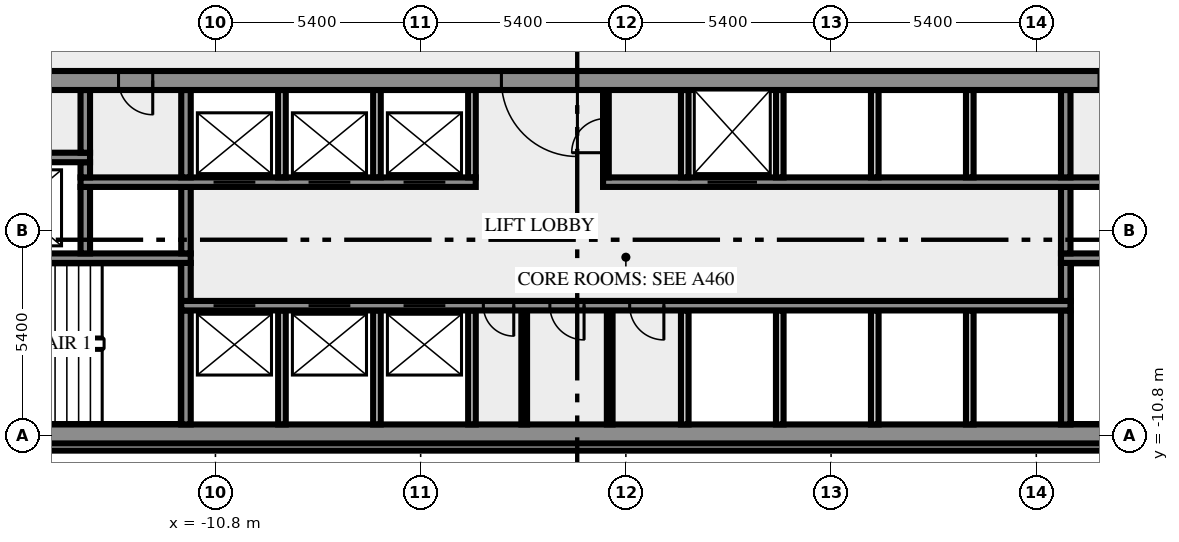
"""IFC4 building model, lengths in metres.
Left out: names, types, materials, properties, quantities, classifications, styles, units other than length and angle.
Written with IfcOpenShell. Run it as: python <this file> out.ifc"""

import sys

from ifc_helpers import new_model, si_unit, direction, frame, frame_2d, origin, place, context, subcontext, project, spatial, rectangle, extrude, element, fill, save


model = new_model("IFC4")
c1 = context("Model", 3, precision=1e-05, world=origin(), true_north=direction((0.0, 1.0)))
c2 = subcontext(c1, "Body", "Model", "MODEL_VIEW")
j1 = project(units=[si_unit("LENGTHUNIT", "METRE"), si_unit("PLANEANGLEUNIT", "RADIAN")], contexts=[c1])
p1 = place(None, origin())
s1 = spatial("IfcSite", under=j1, at=p1, CompositionType="ELEMENT")
p2 = place(p1, origin())
s2 = spatial("IfcBuilding", under=s1, at=p2, CompositionType="ELEMENT")
p3 = place(p2, frame((0.0, 0.0, 67.0)))
s3 = spatial("IfcBuildingStorey", under=s2, at=p3, CompositionType="ELEMENT", Elevation=67.0)
p4 = place(p3, frame((-17.444, -11.088, 0.0), z_axis=(0.0, 0.0, 1.0), x_axis=(1.0, 0.0, 0.0)))
e1 = element("IfcWall", 1, at=p4, inside=s3, PredefinedType="SOLIDWALL", context=c2, shape_type="SweptSolid", body=[
    extrude(rectangle(XDim=34.888, YDim=0.2, at=frame_2d((17.444, 0.0))), origin(), (0.0, 0.0, 1.0), 3.65),
])
p5 = place(p3, frame((-20.0, -10.75, 0.0), z_axis=(0.0, 0.0, 1.0), x_axis=(1.0, 0.0, 0.0)))
e2 = element("IfcWall", 2, at=p5, inside=s3, PredefinedType="SHEAR", context=c2, shape_type="SweptSolid", body=[
    extrude(rectangle(XDim=40.0, YDim=0.5, at=frame_2d((20.0, 0.0))), origin(), (0.0, 0.0, 1.0), 3.65),
])
p6 = place(p5, frame((0.8, 0.0, 1.0)))
e3 = element("IfcOpeningElement", 3, at=p6, cuts=e2, PredefinedType="OPENING", context=c2, shape_type="SweptSolid", body=[
    extrude(rectangle(XDim=1.2, YDim=1.2, at=frame_2d((0.6, 0.6))), frame((0.0, 0.26, 0.0), z_axis=(0.0, -1.0, 0.0), x_axis=(1.0, 0.0, 0.0)), (0.0, 0.0, 1.0), 0.52),
])
p7 = place(p5, frame((38.0, 0.0, 1.0)))
e4 = element("IfcOpeningElement", 4, at=p7, cuts=e2, PredefinedType="OPENING", context=c2, shape_type="SweptSolid", body=[
    extrude(rectangle(XDim=1.2, YDim=1.2, at=frame_2d((0.6, 0.6))), frame((0.0, 0.26, 0.0), z_axis=(0.0, -1.0, 0.0), x_axis=(1.0, 0.0, 0.0)), (0.0, 0.0, 1.0), 0.52),
])
p8 = place(p3, frame((-11.575, -10.5, 0.0), z_axis=(0.0, 0.0, 1.0), x_axis=(0.0, 1.0, 0.0)))
e5 = element("IfcWall", 5, at=p8, inside=s3, PredefinedType="SHEAR", context=c2, shape_type="SweptSolid", body=[
    extrude(rectangle(XDim=3.0, YDim=0.25, at=frame_2d((1.5, 0.0))), origin(), (0.0, 0.0, 1.0), 3.65),
])
for number, where, z_axis, x_axis in (
    (6, (-9.05, -10.5, 0.0), (0.0, 0.0, 1.0), (0.0, 1.0, 0.0)),
    (7, (-6.55, -10.5, 0.0), (0.0, 0.0, 1.0), (0.0, 1.0, 0.0)),
    (8, (-4.05, -10.5, 0.0), (0.0, 0.0, 1.0), (0.0, 1.0, 0.0)),
):
    element("IfcWall", number, at=place(p3, frame(where, z_axis=z_axis, x_axis=x_axis)), inside=s3, PredefinedType="SOLIDWALL", context=c2, shape_type="SweptSolid", body=[
        extrude(rectangle(XDim=3.0, YDim=0.2, at=frame_2d((1.5, 0.0))), origin(), (0.0, 0.0, 1.0), 3.65),
    ])
for number, where, z_axis, x_axis in (
    (9, (-2.675, -10.5, 0.0), (0.0, 0.0, 1.0), (0.0, 1.0, 0.0)),
    (10, (-0.425, -10.5, 0.0), (0.0, 0.0, 1.0), (0.0, 1.0, 0.0)),
):
    element("IfcWall", number, at=place(p3, frame(where, z_axis=z_axis, x_axis=x_axis)), inside=s3, PredefinedType="PARTITIONING", context=c2, shape_type="SweptSolid", body=[
        extrude(rectangle(XDim=3.0, YDim=0.15, at=frame_2d((1.5, 0.0))), origin(), (0.0, 0.0, 1.0), 3.65),
    ])
for number, where, z_axis, x_axis in (
    (11, (1.55, -10.5, 0.0), (0.0, 0.0, 1.0), (0.0, 1.0, 0.0)),
    (12, (4.05, -10.5, 0.0), (0.0, 0.0, 1.0), (0.0, 1.0, 0.0)),
    (13, (6.55, -10.5, 0.0), (0.0, 0.0, 1.0), (0.0, 1.0, 0.0)),
    (14, (9.05, -10.5, 0.0), (0.0, 0.0, 1.0), (0.0, 1.0, 0.0)),
):
    element("IfcWall", number, at=place(p3, frame(where, z_axis=z_axis, x_axis=x_axis)), inside=s3, PredefinedType="SOLIDWALL", context=c2, shape_type="SweptSolid", body=[
        extrude(rectangle(XDim=3.0, YDim=0.2, at=frame_2d((1.5, 0.0))), origin(), (0.0, 0.0, 1.0), 3.65),
    ])
p9 = place(p3, frame((11.575, -10.5, 0.0), z_axis=(0.0, 0.0, 1.0), x_axis=(0.0, 1.0, 0.0)))
e15 = element("IfcWall", 15, at=p9, inside=s3, PredefinedType="SHEAR", context=c2, shape_type="SweptSolid", body=[
    extrude(rectangle(XDim=3.0, YDim=0.25, at=frame_2d((1.5, 0.0))), origin(), (0.0, 0.0, 1.0), 3.65),
])
p10 = place(p3, frame((11.7, -7.375, 0.0), z_axis=(0.0, 0.0, 1.0), x_axis=(-1.0, 0.0, 0.0)))
e16 = element("IfcWall", 16, at=p10, inside=s3, PredefinedType="SHEAR", context=c2, shape_type="SweptSolid", body=[
    extrude(rectangle(XDim=23.4, YDim=0.25, at=frame_2d((11.7, 0.0))), origin(), (0.0, 0.0, 1.0), 3.65),
])
p11 = place(p10, frame((21.45, 0.0, 0.0)))
e17 = element("IfcOpeningElement", 17, at=p11, cuts=e16, PredefinedType="OPENING", context=c2, shape_type="SweptSolid", body=[
    extrude(rectangle(XDim=1.1, YDim=2.1, at=frame_2d((0.55, 1.05))), frame((0.0, 0.135, 0.0), z_axis=(0.0, -1.0, 0.0), x_axis=(1.0, 0.0, 0.0)), (0.0, 0.0, 1.0), 0.27),
])
p12 = place(p10, frame((18.95, 0.0, 0.0)))
e18 = element("IfcOpeningElement", 18, at=p12, cuts=e16, PredefinedType="OPENING", context=c2, shape_type="SweptSolid", body=[
    extrude(rectangle(XDim=1.1, YDim=2.1, at=frame_2d((0.55, 1.05))), frame((0.0, 0.135, 0.0), z_axis=(0.0, -1.0, 0.0), x_axis=(1.0, 0.0, 0.0)), (0.0, 0.0, 1.0), 0.27),
])
p13 = place(p10, frame((16.45, 0.0, 0.0)))
e19 = element("IfcOpeningElement", 19, at=p13, cuts=e16, PredefinedType="OPENING", context=c2, shape_type="SweptSolid", body=[
    extrude(rectangle(XDim=1.1, YDim=2.1, at=frame_2d((0.55, 1.05))), frame((0.0, 0.135, 0.0), z_axis=(0.0, -1.0, 0.0), x_axis=(1.0, 0.0, 0.0)), (0.0, 0.0, 1.0), 0.27),
])
p14 = place(p10, frame((14.65, 0.0, 0.0)))
e20 = element("IfcOpeningElement", 20, at=p14, cuts=e16, PredefinedType="OPENING", context=c2, shape_type="SweptSolid", body=[
    extrude(rectangle(XDim=0.8, YDim=2.1, at=frame_2d((0.4, 1.05))), frame((0.0, 0.135, 0.0), z_axis=(0.0, -1.0, 0.0), x_axis=(1.0, 0.0, 0.0)), (0.0, 0.0, 1.0), 0.27),
])
p15 = place(p10, frame((12.8, 0.0, 0.0)))
e21 = element("IfcOpeningElement", 21, at=p15, cuts=e16, PredefinedType="OPENING", context=c2, shape_type="SweptSolid", body=[
    extrude(rectangle(XDim=0.9, YDim=2.1, at=frame_2d((0.45, 1.05))), frame((0.0, 0.135, 0.0), z_axis=(0.0, -1.0, 0.0), x_axis=(1.0, 0.0, 0.0)), (0.0, 0.0, 1.0), 0.27),
])
p16 = place(p10, frame((10.7, 0.0, 0.0)))
e22 = element("IfcOpeningElement", 22, at=p16, cuts=e16, PredefinedType="OPENING", context=c2, shape_type="SweptSolid", body=[
    extrude(rectangle(XDim=0.9, YDim=2.1, at=frame_2d((0.45, 1.05))), frame((0.0, 0.135, 0.0), z_axis=(0.0, -1.0, 0.0), x_axis=(1.0, 0.0, 0.0)), (0.0, 0.0, 1.0), 0.27),
])
for number, where, z_axis, x_axis in (
    (23, (-11.575, -7.25, 0.0), (0.0, 0.0, 1.0), (0.0, 1.0, 0.0)),
    (24, (11.575, -7.25, 0.0), (0.0, 0.0, 1.0), (0.0, 1.0, 0.0)),
):
    element("IfcWall", number, at=place(p3, frame(where, z_axis=z_axis, x_axis=x_axis)), inside=s3, PredefinedType="SHEAR", context=c2, shape_type="SweptSolid", body=[
        extrude(rectangle(XDim=1.0, YDim=0.25, at=frame_2d((0.5, 0.0))), origin(), (0.0, 0.0, 1.0), 3.65),
    ])
p17 = place(p3, frame((-11.45, -6.125, 0.0), z_axis=(0.0, 0.0, 1.0), x_axis=(-1.0, 0.0, 0.0)))
e25 = element("IfcWall", 25, at=p17, inside=s3, PredefinedType="SHEAR", context=c2, shape_type="SweptSolid", body=[
    extrude(rectangle(XDim=8.05, YDim=0.25, at=frame_2d((4.025, 0.0))), origin(), (0.0, 0.0, 1.0), 3.65),
])
p18 = place(p17, frame((6.2, 0.0, 0.0)))
e26 = element("IfcOpeningElement", 26, at=p18, cuts=e25, PredefinedType="OPENING", context=c2, shape_type="SweptSolid", body=[
    extrude(rectangle(XDim=1.8, YDim=2.1, at=frame_2d((0.9, 1.05))), frame((0.0, 0.135, 0.0), z_axis=(0.0, -1.0, 0.0), x_axis=(1.0, 0.0, 0.0)), (0.0, 0.0, 1.0), 0.27),
])
p19 = place(p3, frame((19.5, -6.125, 0.0), z_axis=(0.0, 0.0, 1.0), x_axis=(-1.0, 0.0, 0.0)))
e27 = element("IfcWall", 27, at=p19, inside=s3, PredefinedType="SHEAR", context=c2, shape_type="SweptSolid", body=[
    extrude(rectangle(XDim=8.05, YDim=0.25, at=frame_2d((4.025, 0.0))), origin(), (0.0, 0.0, 1.0), 3.65),
])
p20 = place(p19, frame((0.05, 0.0, 0.0)))
e28 = element("IfcOpeningElement", 28, at=p20, cuts=e27, PredefinedType="OPENING", context=c2, shape_type="SweptSolid", body=[
    extrude(rectangle(XDim=1.8, YDim=2.1, at=frame_2d((0.9, 1.05))), frame((0.0, 0.135, 0.0), z_axis=(0.0, -1.0, 0.0), x_axis=(1.0, 0.0, 0.0)), (0.0, 0.0, 1.0), 0.27),
])
for number, where, z_axis, x_axis in (
    (29, (-14.225, -6.0, 0.0), (0.0, 0.0, 1.0), (0.0, 1.0, 0.0)),
    (30, (-11.575, -6.0, 0.0), (0.0, 0.0, 1.0), (0.0, 1.0, 0.0)),
    (31, (11.575, -6.0, 0.0), (0.0, 0.0, 1.0), (0.0, 1.0, 0.0)),
):
    element("IfcWall", number, at=place(p3, frame(where, z_axis=z_axis, x_axis=x_axis)), inside=s3, PredefinedType="SHEAR", context=c2, shape_type="SweptSolid", body=[
        extrude(rectangle(XDim=1.75, YDim=0.25, at=frame_2d((0.875, 0.0))), origin(), (0.0, 0.0, 1.0), 3.65),
    ])
p21 = place(p3, frame((-14.35, -4.125, 0.0), z_axis=(0.0, 0.0, 1.0), x_axis=(1.0, 0.0, 0.0)))
e32 = element("IfcWall", 32, at=p21, inside=s3, PredefinedType="SHEAR", context=c2, shape_type="SweptSolid", body=[
    extrude(rectangle(XDim=10.4, YDim=0.25, at=frame_2d((5.2, 0.0))), origin(), (0.0, 0.0, 1.0), 3.65),
])
p22 = place(p21, frame((3.5, 0.0, 0.0)))
e33 = element("IfcOpeningElement", 33, at=p22, cuts=e32, PredefinedType="OPENING", context=c2, shape_type="SweptSolid", body=[
    extrude(rectangle(XDim=1.1, YDim=2.1, at=frame_2d((0.55, 1.05))), frame((0.0, 0.135, 0.0), z_axis=(0.0, -1.0, 0.0), x_axis=(1.0, 0.0, 0.0)), (0.0, 0.0, 1.0), 0.27),
])
p23 = place(p21, frame((6.0, 0.0, 0.0)))
e34 = element("IfcOpeningElement", 34, at=p23, cuts=e32, PredefinedType="OPENING", context=c2, shape_type="SweptSolid", body=[
    extrude(rectangle(XDim=1.1, YDim=2.1, at=frame_2d((0.55, 1.05))), frame((0.0, 0.135, 0.0), z_axis=(0.0, -1.0, 0.0), x_axis=(1.0, 0.0, 0.0)), (0.0, 0.0, 1.0), 0.27),
])
p24 = place(p21, frame((8.5, 0.0, 0.0)))
e35 = element("IfcOpeningElement", 35, at=p24, cuts=e32, PredefinedType="OPENING", context=c2, shape_type="SweptSolid", body=[
    extrude(rectangle(XDim=1.1, YDim=2.1, at=frame_2d((0.55, 1.05))), frame((0.0, 0.135, 0.0), z_axis=(0.0, -1.0, 0.0), x_axis=(1.0, 0.0, 0.0)), (0.0, 0.0, 1.0), 0.27),
])
p25 = place(p3, frame((-0.6, -4.125, 0.0), z_axis=(0.0, 0.0, 1.0), x_axis=(1.0, 0.0, 0.0)))
e36 = element("IfcWall", 36, at=p25, inside=s3, PredefinedType="SHEAR", context=c2, shape_type="SweptSolid", body=[
    extrude(rectangle(XDim=14.95, YDim=0.25, at=frame_2d((7.475, 0.0))), origin(), (0.0, 0.0, 1.0), 3.65),
])
p26 = place(p25, frame((2.75, 0.0, 0.0)))
e37 = element("IfcOpeningElement", 37, at=p26, cuts=e36, PredefinedType="OPENING", context=c2, shape_type="SweptSolid", body=[
    extrude(rectangle(XDim=1.3, YDim=2.1, at=frame_2d((0.65, 1.05))), frame((0.0, 0.135, 0.0), z_axis=(0.0, -1.0, 0.0), x_axis=(1.0, 0.0, 0.0)), (0.0, 0.0, 1.0), 0.27),
])
p27 = place(p3, frame((-14.225, -4.0, 0.0), z_axis=(0.0, 0.0, 1.0), x_axis=(0.0, 1.0, 0.0)))
e38 = element("IfcWall", 38, at=p27, inside=s3, PredefinedType="SHEAR", context=c2, shape_type="SweptSolid", body=[
    extrude(rectangle(XDim=0.4, YDim=0.25, at=frame_2d((0.2, 0.0))), origin(), (0.0, 0.0, 1.0), 3.65),
])
p28 = place(p3, frame((-11.575, -4.0, 0.0), z_axis=(0.0, 0.0, 1.0), x_axis=(0.0, 1.0, 0.0)))
e39 = element("IfcWall", 39, at=p28, inside=s3, PredefinedType="SHEAR", context=c2, shape_type="SweptSolid", body=[
    extrude(rectangle(XDim=2.3, YDim=0.25, at=frame_2d((1.15, 0.0))), origin(), (0.0, 0.0, 1.0), 3.65),
])
for number, where, z_axis, x_axis in (
    (40, (-9.05, -4.0, 0.0), (0.0, 0.0, 1.0), (0.0, 1.0, 0.0)),
    (41, (-6.55, -4.0, 0.0), (0.0, 0.0, 1.0), (0.0, 1.0, 0.0)),
    (42, (-4.05, -4.0, 0.0), (0.0, 0.0, 1.0), (0.0, 1.0, 0.0)),
):
    element("IfcWall", number, at=place(p3, frame(where, z_axis=z_axis, x_axis=x_axis)), inside=s3, PredefinedType="SOLIDWALL", context=c2, shape_type="SweptSolid", body=[
        extrude(rectangle(XDim=2.3, YDim=0.2, at=frame_2d((1.15, 0.0))), origin(), (0.0, 0.0, 1.0), 3.65),
    ])
p29 = place(p3, frame((-0.525, -4.0, 0.0), z_axis=(0.0, 0.0, 1.0), x_axis=(0.0, 1.0, 0.0)))
e43 = element("IfcWall", 43, at=p29, inside=s3, PredefinedType="PARTITIONING", context=c2, shape_type="SweptSolid", body=[
    extrude(rectangle(XDim=2.3, YDim=0.15, at=frame_2d((1.15, 0.0))), origin(), (0.0, 0.0, 1.0), 3.65),
])
p30 = place(p29, frame((0.65, 0.0, 0.0)))
e44 = element("IfcOpeningElement", 44, at=p30, cuts=e43, PredefinedType="OPENING", context=c2, shape_type="SweptSolid", body=[
    extrude(rectangle(XDim=0.9, YDim=2.1, at=frame_2d((0.45, 1.05))), frame((0.0, 0.085, 0.0), z_axis=(0.0, -1.0, 0.0), x_axis=(1.0, 0.0, 0.0)), (0.0, 0.0, 1.0), 0.17),
])
for number, where, z_axis, x_axis in (
    (45, (1.55, -4.0, 0.0), (0.0, 0.0, 1.0), (0.0, 1.0, 0.0)),
    (46, (4.05, -4.0, 0.0), (0.0, 0.0, 1.0), (0.0, 1.0, 0.0)),
    (47, (6.55, -4.0, 0.0), (0.0, 0.0, 1.0), (0.0, 1.0, 0.0)),
    (48, (9.05, -4.0, 0.0), (0.0, 0.0, 1.0), (0.0, 1.0, 0.0)),
):
    element("IfcWall", number, at=place(p3, frame(where, z_axis=z_axis, x_axis=x_axis)), inside=s3, PredefinedType="SOLIDWALL", context=c2, shape_type="SweptSolid", body=[
        extrude(rectangle(XDim=2.3, YDim=0.2, at=frame_2d((1.15, 0.0))), origin(), (0.0, 0.0, 1.0), 3.65),
    ])
p31 = place(p3, frame((11.575, -4.0, 0.0), z_axis=(0.0, 0.0, 1.0), x_axis=(0.0, 1.0, 0.0)))
e49 = element("IfcWall", 49, at=p31, inside=s3, PredefinedType="SHEAR", context=c2, shape_type="SweptSolid", body=[
    extrude(rectangle(XDim=2.3, YDim=0.25, at=frame_2d((1.15, 0.0))), origin(), (0.0, 0.0, 1.0), 3.65),
])
p32 = place(p3, frame((-17.35, -3.475, 0.0), z_axis=(0.0, 0.0, 1.0), x_axis=(1.0, 0.0, 0.0)))
e50 = element("IfcWall", 50, at=p32, inside=s3, PredefinedType="SHEAR", context=c2, shape_type="SweptSolid", body=[
    extrude(rectangle(XDim=3.25, YDim=0.25, at=frame_2d((1.625, 0.0))), origin(), (0.0, 0.0, 1.0), 3.65),
])
p33 = place(p3, frame((-14.225, -3.35, 0.0), z_axis=(0.0, 0.0, 1.0), x_axis=(0.0, 1.0, 0.0)))
e51 = element("IfcWall", 51, at=p33, inside=s3, PredefinedType="SHEAR", context=c2, shape_type="SweptSolid", body=[
    extrude(rectangle(XDim=1.65, YDim=0.25, at=frame_2d((0.825, 0.0))), origin(), (0.0, 0.0, 1.0), 3.65),
])
p34 = place(p3, frame((20.49, -1.45, 0.0), z_axis=(0.0, 0.0, 1.0), x_axis=(-1.0, 0.0, 0.0)))
e52 = element("IfcWall", 52, at=p34, inside=s3, PredefinedType="SHEAR", context=c2, shape_type="SweptSolid", body=[
    extrude(rectangle(XDim=40.98, YDim=0.5, at=frame_2d((20.49, 0.0))), origin(), (0.0, 0.0, 1.0), 3.65),
])
p35 = place(p34, frame((38.14, 0.0, 0.0)))
e53 = element("IfcOpeningElement", 53, at=p35, cuts=e52, PredefinedType="OPENING", context=c2, shape_type="SweptSolid", body=[
    extrude(rectangle(XDim=1.8, YDim=2.1, at=frame_2d((0.9, 1.05))), frame((0.0, 0.26, 0.0), z_axis=(0.0, -1.0, 0.0), x_axis=(1.0, 0.0, 0.0)), (0.0, 0.0, 1.0), 0.52),
])
p36 = place(p34, frame((35.89, 0.0, 0.0)))
e54 = element("IfcOpeningElement", 54, at=p36, cuts=e52, PredefinedType="OPENING", context=c2, shape_type="SweptSolid", body=[
    extrude(rectangle(XDim=0.9, YDim=2.1, at=frame_2d((0.45, 1.05))), frame((0.0, 0.26, 0.0), z_axis=(0.0, -1.0, 0.0), x_axis=(1.0, 0.0, 0.0)), (0.0, 0.0, 1.0), 0.52),
])
p37 = place(p34, frame((32.94, 0.0, 0.0)))
e55 = element("IfcOpeningElement", 55, at=p37, cuts=e52, PredefinedType="OPENING", context=c2, shape_type="SweptSolid", body=[
    extrude(rectangle(XDim=0.9, YDim=2.1, at=frame_2d((0.45, 1.05))), frame((0.0, 0.26, 0.0), z_axis=(0.0, -1.0, 0.0), x_axis=(1.0, 0.0, 0.0)), (0.0, 0.0, 1.0), 0.52),
])
p38 = place(p34, frame((21.765, 0.0, 0.0)))
e56 = element("IfcOpeningElement", 56, at=p38, cuts=e52, PredefinedType="OPENING", context=c2, shape_type="SweptSolid", body=[
    extrude(rectangle(XDim=2.0, YDim=2.1, at=frame_2d((1.0, 1.05))), frame((0.0, 0.26, 0.0), z_axis=(0.0, -1.0, 0.0), x_axis=(1.0, 0.0, 0.0)), (0.0, 0.0, 1.0), 0.52),
])
p39 = place(p34, frame((7.14, 0.0, 0.0)))
e57 = element("IfcOpeningElement", 57, at=p39, cuts=e52, PredefinedType="OPENING", context=c2, shape_type="SweptSolid", body=[
    extrude(rectangle(XDim=0.9, YDim=2.1, at=frame_2d((0.45, 1.05))), frame((0.0, 0.26, 0.0), z_axis=(0.0, -1.0, 0.0), x_axis=(1.0, 0.0, 0.0)), (0.0, 0.0, 1.0), 0.52),
])
p40 = place(p34, frame((5.028, 0.0, 0.0)))
e58 = element("IfcOpeningElement", 58, at=p40, cuts=e52, PredefinedType="OPENING", context=c2, shape_type="SweptSolid", body=[
    extrude(rectangle(XDim=0.8, YDim=2.1, at=frame_2d((0.4, 1.05))), frame((0.0, 0.26, 0.0), z_axis=(0.0, -1.0, 0.0), x_axis=(1.0, 0.0, 0.0)), (0.0, 0.0, 1.0), 0.52),
])
p41 = place(p34, frame((3.452, 0.0, 0.0)))
e59 = element("IfcOpeningElement", 59, at=p41, cuts=e52, PredefinedType="OPENING", context=c2, shape_type="SweptSolid", body=[
    extrude(rectangle(XDim=0.8, YDim=2.1, at=frame_2d((0.4, 1.05))), frame((0.0, 0.26, 0.0), z_axis=(0.0, -1.0, 0.0), x_axis=(1.0, 0.0, 0.0)), (0.0, 0.0, 1.0), 0.52),
])
p42 = place(p34, frame((1.04, 0.0, 0.0)))
e60 = element("IfcOpeningElement", 60, at=p42, cuts=e52, PredefinedType="OPENING", context=c2, shape_type="SweptSolid", body=[
    extrude(rectangle(XDim=1.8, YDim=2.1, at=frame_2d((0.9, 1.05))), frame((0.0, 0.26, 0.0), z_axis=(0.0, -1.0, 0.0), x_axis=(1.0, 0.0, 0.0)), (0.0, 0.0, 1.0), 0.52),
])
p43 = place(p11, origin())
e61 = element("IfcDoor", 61, at=p43, inside=s3, OperationType="DOUBLE_DOOR_SLIDING", PredefinedType="DOOR", context=c2, shape_type="SweptSolid", body=[
    extrude(rectangle(XDim=1.1, YDim=2.1, at=frame_2d((0.55, 1.05))), frame((0.0, 0.025, 0.0), z_axis=(0.0, -1.0, 0.0), x_axis=(1.0, 0.0, 0.0)), (0.0, 0.0, 1.0), 0.05),
])
fill(e17, e61)
p44 = place(p12, origin())
e62 = element("IfcDoor", 62, at=p44, inside=s3, OperationType="DOUBLE_DOOR_SLIDING", PredefinedType="DOOR", context=c2, shape_type="SweptSolid", body=[
    extrude(rectangle(XDim=1.1, YDim=2.1, at=frame_2d((0.55, 1.05))), frame((0.0, 0.025, 0.0), z_axis=(0.0, -1.0, 0.0), x_axis=(1.0, 0.0, 0.0)), (0.0, 0.0, 1.0), 0.05),
])
fill(e18, e62)
p45 = place(p13, origin())
e63 = element("IfcDoor", 63, at=p45, inside=s3, OperationType="DOUBLE_DOOR_SLIDING", PredefinedType="DOOR", context=c2, shape_type="SweptSolid", body=[
    extrude(rectangle(XDim=1.1, YDim=2.1, at=frame_2d((0.55, 1.05))), frame((0.0, 0.025, 0.0), z_axis=(0.0, -1.0, 0.0), x_axis=(1.0, 0.0, 0.0)), (0.0, 0.0, 1.0), 0.05),
])
fill(e19, e63)
p46 = place(p14, origin())
e64 = element("IfcDoor", 64, at=p46, inside=s3, OperationType="SINGLE_SWING_RIGHT", PredefinedType="DOOR", context=c2, shape_type="SweptSolid", body=[
    extrude(rectangle(XDim=0.8, YDim=2.1, at=frame_2d((0.4, 1.05))), frame((0.0, 0.025, 0.0), z_axis=(0.0, -1.0, 0.0), x_axis=(1.0, 0.0, 0.0)), (0.0, 0.0, 1.0), 0.05),
])
fill(e20, e64)
p47 = place(p15, origin())
e65 = element("IfcDoor", 65, at=p47, inside=s3, OperationType="SINGLE_SWING_RIGHT", PredefinedType="DOOR", context=c2, shape_type="SweptSolid", body=[
    extrude(rectangle(XDim=0.9, YDim=2.1, at=frame_2d((0.45, 1.05))), frame((0.0, 0.025, 0.0), z_axis=(0.0, -1.0, 0.0), x_axis=(1.0, 0.0, 0.0)), (0.0, 0.0, 1.0), 0.05),
])
fill(e21, e65)
p48 = place(p16, origin())
e66 = element("IfcDoor", 66, at=p48, inside=s3, OperationType="SINGLE_SWING_LEFT", PredefinedType="DOOR", context=c2, shape_type="SweptSolid", body=[
    extrude(rectangle(XDim=0.9, YDim=2.1, at=frame_2d((0.45, 1.05))), frame((0.0, 0.025, 0.0), z_axis=(0.0, -1.0, 0.0), x_axis=(1.0, 0.0, 0.0)), (0.0, 0.0, 1.0), 0.05),
])
fill(e22, e66)
p49 = place(p22, origin())
e67 = element("IfcDoor", 67, at=p49, inside=s3, OperationType="DOUBLE_DOOR_SLIDING", PredefinedType="DOOR", context=c2, shape_type="SweptSolid", body=[
    extrude(rectangle(XDim=1.1, YDim=2.1, at=frame_2d((0.55, 1.05))), frame((0.0, 0.025, 0.0), z_axis=(0.0, -1.0, 0.0), x_axis=(1.0, 0.0, 0.0)), (0.0, 0.0, 1.0), 0.05),
])
fill(e33, e67)
p50 = place(p23, origin())
e68 = element("IfcDoor", 68, at=p50, inside=s3, OperationType="DOUBLE_DOOR_SLIDING", PredefinedType="DOOR", context=c2, shape_type="SweptSolid", body=[
    extrude(rectangle(XDim=1.1, YDim=2.1, at=frame_2d((0.55, 1.05))), frame((0.0, 0.025, 0.0), z_axis=(0.0, -1.0, 0.0), x_axis=(1.0, 0.0, 0.0)), (0.0, 0.0, 1.0), 0.05),
])
fill(e34, e68)
p51 = place(p24, origin())
e69 = element("IfcDoor", 69, at=p51, inside=s3, OperationType="DOUBLE_DOOR_SLIDING", PredefinedType="DOOR", context=c2, shape_type="SweptSolid", body=[
    extrude(rectangle(XDim=1.1, YDim=2.1, at=frame_2d((0.55, 1.05))), frame((0.0, 0.025, 0.0), z_axis=(0.0, -1.0, 0.0), x_axis=(1.0, 0.0, 0.0)), (0.0, 0.0, 1.0), 0.05),
])
fill(e35, e69)
p52 = place(p26, origin())
e70 = element("IfcDoor", 70, at=p52, inside=s3, OperationType="DOUBLE_DOOR_SLIDING", PredefinedType="DOOR", context=c2, shape_type="SweptSolid", body=[
    extrude(rectangle(XDim=1.3, YDim=2.1, at=frame_2d((0.65, 1.05))), frame((0.0, 0.025, 0.0), z_axis=(0.0, -1.0, 0.0), x_axis=(1.0, 0.0, 0.0)), (0.0, 0.0, 1.0), 0.05),
])
fill(e37, e70)
p53 = place(p30, origin())
e71 = element("IfcDoor", 71, at=p53, inside=s3, OperationType="SINGLE_SWING_LEFT", PredefinedType="DOOR", context=c2, shape_type="SweptSolid", body=[
    extrude(rectangle(XDim=0.9, YDim=2.1, at=frame_2d((0.45, 1.05))), frame((0.0, 0.025, 0.0), z_axis=(0.0, -1.0, 0.0), x_axis=(1.0, 0.0, 0.0)), (0.0, 0.0, 1.0), 0.05),
])
fill(e44, e71)
p54 = place(p37, origin())
e72 = element("IfcDoor", 72, at=p54, inside=s3, OperationType="SINGLE_SWING_RIGHT", PredefinedType="DOOR", context=c2, shape_type="SweptSolid", body=[
    extrude(rectangle(XDim=0.9, YDim=2.1, at=frame_2d((0.45, 1.05))), frame((0.0, 0.025, 0.0), z_axis=(0.0, -1.0, 0.0), x_axis=(1.0, 0.0, 0.0)), (0.0, 0.0, 1.0), 0.05),
])
fill(e55, e72)
p55 = place(p38, origin())
e73 = element("IfcDoor", 73, at=p55, inside=s3, OperationType="DOUBLE_DOOR_SINGLE_SWING", PredefinedType="DOOR", context=c2, shape_type="SweptSolid", body=[
    extrude(rectangle(XDim=2.0, YDim=2.1, at=frame_2d((1.0, 1.05))), frame((0.0, 0.025, 0.0), z_axis=(0.0, -1.0, 0.0), x_axis=(1.0, 0.0, 0.0)), (0.0, 0.0, 1.0), 0.05),
])
fill(e56, e73)
save(model, sys.argv[1])
